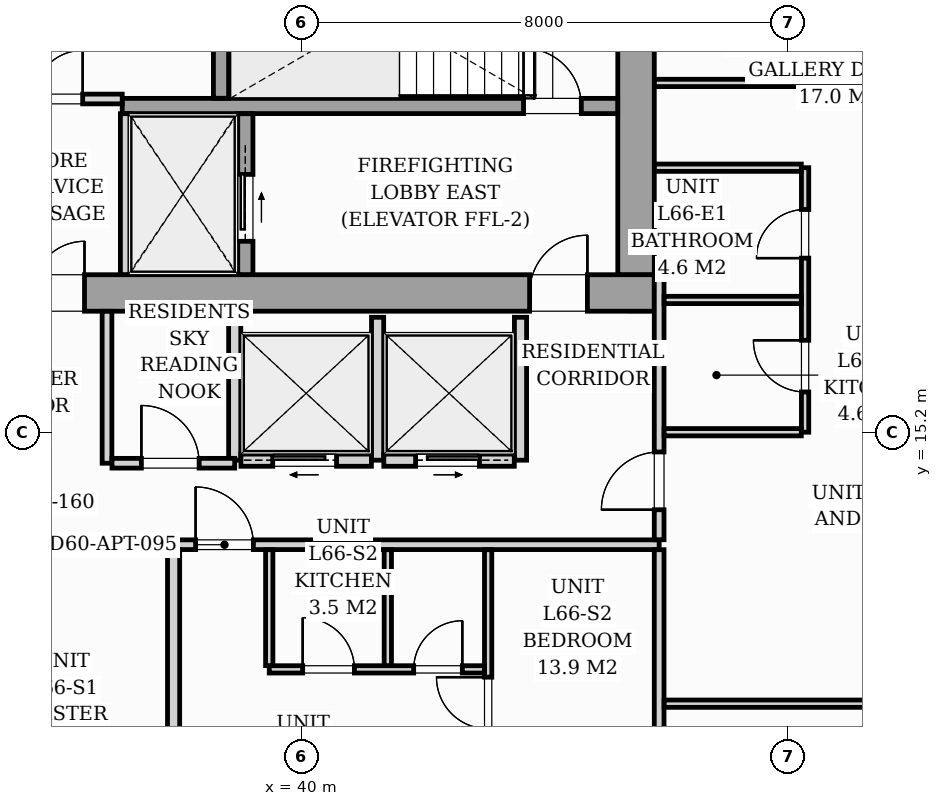
"""IFC4 building model, lengths in metres.
Left out: names, types, materials, properties, quantities, classifications, styles, units other than length and angle.
Written with IfcOpenShell. Run it as: python <this file> out.ifc"""

import sys

from ifc_helpers import new_model, si_unit, direction, frame, frame_2d, origin, origin_2d, place, context, subcontext, project, spatial, rectangle, i_section, extrude, source, transform, mapped, element, fill, save


model = new_model("IFC4")
c1 = context("Model", 3, precision=1e-05, world=origin(), true_north=direction((0.0, 1.0)))
c2 = subcontext(c1, "Body", "Model", "MODEL_VIEW")
j1 = project(units=[si_unit("LENGTHUNIT", "METRE"), si_unit("PLANEANGLEUNIT", "RADIAN")], contexts=[c1])
p1 = place(None, origin())
s1 = spatial("IfcSite", under=j1, at=p1, CompositionType="ELEMENT")
p2 = place(p1, origin())
s2 = spatial("IfcBuilding", under=s1, at=p2, CompositionType="ELEMENT")
p3 = place(p2, frame((0.0, 0.0, 229.8)))
s3 = spatial("IfcBuildingStorey", under=s2, at=p3, CompositionType="ELEMENT", Elevation=229.8)
m1 = source(origin(), c2, "Body", "SweptSolid", [
    extrude(i_section(OverallWidth=0.409, OverallDepth=0.425, WebThickness=0.033, FlangeThickness=0.052, FilletRadius=0.018, at=origin_2d()), origin(), (0.0, 0.0, 1.0), 3.296),
])
for number, where, z_axis, x_axis in (
    (1, (38.88, 17.4, 0.002), (0.0, 0.0, 1.0), (1.0, 0.0, 0.0)),
    (2, (45.6, 17.4, 0.002), (0.0, 0.0, 1.0), (1.0, 0.0, 0.0)),
):
    element("IfcColumn", number, at=place(p3, frame(where, z_axis=z_axis, x_axis=x_axis)), inside=s3, PredefinedType="PILASTER", context=c2, shape_type="MappedRepresentation", body=[
        mapped(m1, transform((0.0, 0.0, 0.0), scale=1.0)),
    ])
p4 = place(p3, frame((26.2, 17.5, 0.0), z_axis=(0.0, 0.0, 1.0), x_axis=(1.0, 0.0, 0.0)))
e3 = element("IfcWall", 3, at=p4, inside=s3, PredefinedType="SHEAR", context=c2, shape_type="SweptSolid", body=[
    extrude(rectangle(XDim=19.6, YDim=0.6, at=frame_2d((9.8, 0.0))), origin(), (0.0, 0.0, 1.0), 3.3),
])
p5 = place(p4, frame((0.95, 0.0, 0.0)))
e4 = element("IfcOpeningElement", 4, at=p5, cuts=e3, PredefinedType="OPENING", context=c2, shape_type="SweptSolid", body=[
    extrude(rectangle(XDim=0.95, YDim=2.06, at=frame_2d((0.475, 1.03))), frame((0.0, 0.31, 0.0), z_axis=(0.0, -1.0, 0.0), x_axis=(1.0, 0.0, 0.0)), (0.0, 0.0, 1.0), 0.62),
])
p6 = place(p4, frame((9.38, 0.0, 0.0)))
e5 = element("IfcOpeningElement", 5, at=p6, cuts=e3, PredefinedType="OPENING", context=c2, shape_type="SweptSolid", body=[
    extrude(rectangle(XDim=0.85, YDim=2.0, at=frame_2d((0.425, 1.0))), frame((0.0, 0.31, 0.0), z_axis=(0.0, -1.0, 0.0), x_axis=(1.0, 0.0, 0.0)), (0.0, 0.0, 1.0), 0.62),
])
p7 = place(p4, frame((17.55, 0.0, 0.0)))
e6 = element("IfcOpeningElement", 6, at=p7, cuts=e3, PredefinedType="OPENING", context=c2, shape_type="SweptSolid", body=[
    extrude(rectangle(XDim=0.95, YDim=2.06, at=frame_2d((0.475, 1.03))), frame((0.0, 0.31, 0.0), z_axis=(0.0, -1.0, 0.0), x_axis=(1.0, 0.0, 0.0)), (0.0, 0.0, 1.0), 0.62),
])
p8 = place(p3, frame((45.5, 17.802, 0.0), z_axis=(0.0, 0.0, 1.0), x_axis=(0.0, 1.0, 0.0)))
e7 = element("IfcWall", 7, at=p8, inside=s3, PredefinedType="SHEAR", context=c2, shape_type="SweptSolid", body=[
    extrude(rectangle(XDim=5.796, YDim=0.6, at=frame_2d((2.898, 0.0))), origin(), (0.0, 0.0, 1.0), 3.3),
])
p9 = place(p3, frame((37.05, 20.575, 0.0), z_axis=(0.0, 0.0, 1.0), x_axis=(1.0, 0.0, 0.0)))
e8 = element("IfcWall", 8, at=p9, inside=s3, PredefinedType="SOLIDWALL", context=c2, shape_type="SweptSolid", body=[
    extrude(rectangle(XDim=8.148, YDim=0.25, at=frame_2d((4.074, 0.0))), origin(), (0.0, 0.0, 1.0), 3.3),
])
p10 = place(p9, frame((6.6, 0.0, 0.0)))
e9 = element("IfcOpeningElement", 9, at=p10, cuts=e8, PredefinedType="OPENING", context=c2, shape_type="SweptSolid", body=[
    extrude(rectangle(XDim=0.95, YDim=2.06, at=frame_2d((0.475, 1.03))), frame((0.0, 0.135, 0.0), z_axis=(0.0, -1.0, 0.0), x_axis=(1.0, 0.0, 0.0)), (0.0, 0.0, 1.0), 0.27),
])
p11 = place(p3, frame((38.675, 20.702, 0.0), z_axis=(0.0, 0.0, 1.0), x_axis=(0.0, 1.0, 0.0)))
e10 = element("IfcWall", 10, at=p11, inside=s3, PredefinedType="SOLIDWALL", context=c2, shape_type="SweptSolid", body=[
    extrude(rectangle(XDim=2.896, YDim=0.25, at=frame_2d((1.448, 0.0))), origin(), (0.0, 0.0, 1.0), 3.3),
])
p12 = place(p3, frame((37.1, 17.802, 0.0), z_axis=(0.0, 0.0, 1.0), x_axis=(0.0, 1.0, 0.0)))
e11 = element("IfcWall", 11, at=p12, inside=s3, PredefinedType="PARTITIONING", context=c2, shape_type="SweptSolid", body=[
    extrude(rectangle(XDim=2.646, YDim=0.16, at=frame_2d((1.323, 0.0))), origin(), (0.0, 0.0, 1.0), 3.04),
])
p13 = place(p3, frame((39.075, 17.802, 0.0), z_axis=(0.0, 0.0, 1.0), x_axis=(0.0, 1.0, 0.0)))
e12 = element("IfcWall", 12, at=p13, inside=s3, PredefinedType="SOLIDWALL", context=c2, shape_type="SweptSolid", body=[
    extrude(rectangle(XDim=2.646, YDim=0.25, at=frame_2d((1.323, 0.0))), origin(), (0.0, 0.0, 1.0), 3.3),
])
p14 = place(p13, frame((0.548, 0.0, 0.0)))
e13 = element("IfcOpeningElement", 13, at=p14, cuts=e12, PredefinedType="OPENING", context=c2, shape_type="SweptSolid", body=[
    extrude(rectangle(XDim=1.1, YDim=2.08, at=frame_2d((0.55, 1.04))), frame((0.0, 0.135, 0.0), z_axis=(0.0, -1.0, 0.0), x_axis=(1.0, 0.0, 0.0)), (0.0, 0.0, 1.0), 0.27),
])
p15 = place(p3, frame((34.95, 20.69, 0.0), z_axis=(0.0, 0.0, 1.0), x_axis=(1.0, 0.0, 0.0)))
e14 = element("IfcWall", 14, at=p15, inside=s3, PredefinedType="PARTITIONING", context=c2, shape_type="SweptSolid", body=[
    extrude(rectangle(XDim=2.1, YDim=0.16, at=frame_2d((1.05, 0.0))), origin(), (0.0, 0.0, 1.0), 3.04),
])
p16 = place(p15, frame((0.65, 0.0, 0.0)))
e15 = element("IfcOpeningElement", 15, at=p16, cuts=e14, PredefinedType="OPENING", context=c2, shape_type="SweptSolid", body=[
    extrude(rectangle(XDim=0.8, YDim=2.05, at=frame_2d((0.4, 1.025))), frame((0.0, 0.09, 0.0), z_axis=(0.0, -1.0, 0.0), x_axis=(1.0, 0.0, 0.0)), (0.0, 0.0, 1.0), 0.18),
])
for number, where, z_axis, x_axis in (
    (16, (38.9, 14.75, 0.0), (0.0, 0.0, 1.0), (0.0, 1.0, 0.0)),
    (17, (41.25, 14.75, 0.0), (0.0, 0.0, 1.0), (0.0, 1.0, 0.0)),
    (18, (43.6, 14.75, 0.0), (0.0, 0.0, 1.0), (0.0, 1.0, 0.0)),
):
    element("IfcWall", number, at=place(p3, frame(where, z_axis=z_axis, x_axis=x_axis)), inside=s3, PredefinedType="PARTITIONING", context=c2, shape_type="SweptSolid", body=[
        extrude(rectangle(XDim=2.35, YDim=0.2, at=frame_2d((1.175, 0.0))), origin(), (0.0, 0.0, 1.0), 3.04),
    ])
p17 = place(p3, frame((39.002, 14.75, 0.0), z_axis=(0.0, 0.0, 1.0), x_axis=(1.0, 0.0, 0.0)))
e19 = element("IfcWall", 19, at=p17, inside=s3, PredefinedType="PARTITIONING", context=c2, shape_type="SweptSolid", body=[
    extrude(rectangle(XDim=2.146, YDim=0.2, at=frame_2d((1.073, 0.0))), origin(), (0.0, 0.0, 1.0), 3.04),
])
p18 = place(p17, frame((0.523, 0.0, 0.0)))
e20 = element("IfcOpeningElement", 20, at=p18, cuts=e19, PredefinedType="OPENING", context=c2, shape_type="SweptSolid", body=[
    extrude(rectangle(XDim=1.05, YDim=2.08, at=frame_2d((0.525, 1.04))), frame((0.0, 0.11, 0.0), z_axis=(0.0, -1.0, 0.0), x_axis=(1.0, 0.0, 0.0)), (0.0, 0.0, 1.0), 0.22),
])
p19 = place(p3, frame((41.352, 14.75, 0.0), z_axis=(0.0, 0.0, 1.0), x_axis=(1.0, 0.0, 0.0)))
e21 = element("IfcWall", 21, at=p19, inside=s3, PredefinedType="PARTITIONING", context=c2, shape_type="SweptSolid", body=[
    extrude(rectangle(XDim=2.146, YDim=0.2, at=frame_2d((1.073, 0.0))), origin(), (0.0, 0.0, 1.0), 3.04),
])
p20 = place(p19, frame((0.523, 0.0, 0.0)))
e22 = element("IfcOpeningElement", 22, at=p20, cuts=e21, PredefinedType="OPENING", context=c2, shape_type="SweptSolid", body=[
    extrude(rectangle(XDim=1.05, YDim=2.08, at=frame_2d((0.525, 1.04))), frame((0.0, 0.11, 0.0), z_axis=(0.0, -1.0, 0.0), x_axis=(1.0, 0.0, 0.0)), (0.0, 0.0, 1.0), 0.22),
])
p21 = place(p3, frame((24.55, 13.36, 0.0), z_axis=(0.0, 0.0, 1.0), x_axis=(1.0, 0.0, 0.0)))
e23 = element("IfcWall", 23, at=p21, inside=s3, PredefinedType="PARTITIONING", context=c2, shape_type="SweptSolid", body=[
    extrude(rectangle(XDim=21.33, YDim=0.16, at=frame_2d((10.665, 0.0))), origin(), (0.0, 0.0, 1.0), 2.55),
])
p22 = place(p21, frame((2.37, 0.0, 0.0)))
e24 = element("IfcOpeningElement", 24, at=p22, cuts=e23, PredefinedType="OPENING", context=c2, shape_type="SweptSolid", body=[
    extrude(rectangle(XDim=0.95, YDim=2.06, at=frame_2d((0.475, 1.03))), frame((0.0, 0.09, 0.0), z_axis=(0.0, -1.0, 0.0), x_axis=(1.0, 0.0, 0.0)), (0.0, 0.0, 1.0), 0.18),
])
p23 = place(p21, frame((13.707, 0.0, 0.0)))
e25 = element("IfcOpeningElement", 25, at=p23, cuts=e23, PredefinedType="OPENING", context=c2, shape_type="SweptSolid", body=[
    extrude(rectangle(XDim=0.95, YDim=2.06, at=frame_2d((0.475, 1.03))), frame((0.0, 0.09, 0.0), z_axis=(0.0, -1.0, 0.0), x_axis=(1.0, 0.0, 0.0)), (0.0, 0.0, 1.0), 0.18),
])
p24 = place(p3, frame((45.88, 8.136, 0.0), z_axis=(0.0, 0.0, 1.0), x_axis=(0.0, 1.0, 0.0)))
e26 = element("IfcWall", 26, at=p24, inside=s3, PredefinedType="PARTITIONING", context=c2, shape_type="SweptSolid", body=[
    extrude(rectangle(XDim=5.142, YDim=0.16, at=frame_2d((2.571, 0.0))), origin(), (0.0, 0.0, 1.0), 3.04),
])
p25 = place(p3, frame((45.88, 13.442, 0.0), z_axis=(0.0, 0.0, 1.0), x_axis=(0.0, 1.0, 0.0)))
e27 = element("IfcWall", 27, at=p25, inside=s3, PredefinedType="PARTITIONING", context=c2, shape_type="SweptSolid", body=[
    extrude(rectangle(XDim=4.36, YDim=0.16, at=frame_2d((2.18, 0.0))), origin(), (0.0, 0.0, 1.0), 3.04),
])
p26 = place(p25, frame((0.493, 0.0, 0.0)))
e28 = element("IfcOpeningElement", 28, at=p26, cuts=e27, PredefinedType="OPENING", context=c2, shape_type="SweptSolid", body=[
    extrude(rectangle(XDim=0.95, YDim=2.06, at=frame_2d((0.475, 1.03))), frame((0.0, 0.09, 0.0), z_axis=(0.0, -1.0, 0.0), x_axis=(1.0, 0.0, 0.0)), (0.0, 0.0, 1.0), 0.18),
])
p27 = place(p3, frame((37.895, 8.68, 0.0), z_axis=(0.0, 0.0, 1.0), x_axis=(0.0, 1.0, 0.0)))
e29 = element("IfcWall", 29, at=p27, inside=s3, PredefinedType="PARTITIONING", context=c2, shape_type="SweptSolid", body=[
    extrude(rectangle(XDim=4.598, YDim=0.2, at=frame_2d((2.299, 0.0))), origin(), (0.0, 0.0, 1.0), 3.04),
])
p28 = place(p3, frame((43.068, 8.392, 0.0), z_axis=(0.0, 0.0, 1.0), x_axis=(0.0, 1.0, 0.0)))
e30 = element("IfcWall", 30, at=p28, inside=s3, PredefinedType="PARTITIONING", context=c2, shape_type="SweptSolid", body=[
    extrude(rectangle(XDim=4.886, YDim=0.12, at=frame_2d((2.443, 0.0))), origin(), (0.0, 0.0, 1.0), 3.04),
])
p29 = place(p28, frame((1.94, 0.0, 0.0)))
e31 = element("IfcOpeningElement", 31, at=p29, cuts=e30, PredefinedType="OPENING", context=c2, shape_type="SweptSolid", body=[
    extrude(rectangle(XDim=0.85, YDim=2.05, at=frame_2d((0.425, 1.025))), frame((0.0, 0.07, 0.0), z_axis=(0.0, -1.0, 0.0), x_axis=(1.0, 0.0, 0.0)), (0.0, 0.0, 1.0), 0.14),
])
p30 = place(p3, frame((39.468, 11.31, 0.0), z_axis=(0.0, 0.0, 1.0), x_axis=(1.0, 0.0, 0.0)))
e32 = element("IfcWall", 32, at=p30, inside=s3, PredefinedType="PARTITIONING", context=c2, shape_type="SweptSolid", body=[
    extrude(rectangle(XDim=3.538, YDim=0.12, at=frame_2d((1.769, 0.0))), origin(), (0.0, 0.0, 1.0), 3.04),
])
p31 = place(p30, frame((0.55, 0.0, 0.0)))
e33 = element("IfcOpeningElement", 33, at=p31, cuts=e32, PredefinedType="OPENING", context=c2, shape_type="SweptSolid", body=[
    extrude(rectangle(XDim=0.85, YDim=2.05, at=frame_2d((0.425, 1.025))), frame((0.0, 0.07, 0.0), z_axis=(0.0, -1.0, 0.0), x_axis=(1.0, 0.0, 0.0)), (0.0, 0.0, 1.0), 0.14),
])
p32 = place(p30, frame((2.375, 0.0, 0.0)))
e34 = element("IfcOpeningElement", 34, at=p32, cuts=e32, PredefinedType="OPENING", context=c2, shape_type="SweptSolid", body=[
    extrude(rectangle(XDim=0.8, YDim=2.02, at=frame_2d((0.4, 1.01))), frame((0.0, 0.07, 0.0), z_axis=(0.0, -1.0, 0.0), x_axis=(1.0, 0.0, 0.0)), (0.0, 0.0, 1.0), 0.14),
])
for number, where, z_axis, x_axis in (
    (35, (39.468, 11.372, 0.0), (0.0, 0.0, 1.0), (0.0, 1.0, 0.0)),
    (36, (41.418, 11.372, 0.0), (0.0, 0.0, 1.0), (0.0, 1.0, 0.0)),
):
    element("IfcWall", number, at=place(p3, frame(where, z_axis=z_axis, x_axis=x_axis)), inside=s3, PredefinedType="PARTITIONING", context=c2, shape_type="SweptSolid", body=[
        extrude(rectangle(XDim=1.906, YDim=0.12, at=frame_2d((0.953, 0.0))), origin(), (0.0, 0.0, 1.0), 3.04),
    ])
p33 = place(p3, frame((48.28, 15.21, 0.0), z_axis=(0.0, 0.0, 1.0), x_axis=(0.0, 1.0, 0.0)))
e37 = element("IfcWall", 37, at=p33, inside=s3, PredefinedType="PARTITIONING", context=c2, shape_type="SweptSolid", body=[
    extrude(rectangle(XDim=4.35, YDim=0.12, at=frame_2d((2.175, 0.0))), origin(), (0.0, 0.0, 1.0), 3.04),
])
p34 = place(p33, frame((0.662, 0.0, 0.0)))
e38 = element("IfcOpeningElement", 38, at=p34, cuts=e37, PredefinedType="OPENING", context=c2, shape_type="SweptSolid", body=[
    extrude(rectangle(XDim=0.85, YDim=2.05, at=frame_2d((0.425, 1.025))), frame((0.0, 0.07, 0.0), z_axis=(0.0, -1.0, 0.0), x_axis=(1.0, 0.0, 0.0)), (0.0, 0.0, 1.0), 0.14),
])
p35 = place(p33, frame((2.863, 0.0, 0.0)))
e39 = element("IfcOpeningElement", 39, at=p35, cuts=e37, PredefinedType="OPENING", context=c2, shape_type="SweptSolid", body=[
    extrude(rectangle(XDim=0.8, YDim=2.02, at=frame_2d((0.4, 1.01))), frame((0.0, 0.07, 0.0), z_axis=(0.0, -1.0, 0.0), x_axis=(1.0, 0.0, 0.0)), (0.0, 0.0, 1.0), 0.14),
])
p36 = place(p3, frame((45.962, 17.385, 0.0), z_axis=(0.0, 0.0, 1.0), x_axis=(1.0, 0.0, 0.0)))
e40 = element("IfcWall", 40, at=p36, inside=s3, PredefinedType="PARTITIONING", context=c2, shape_type="SweptSolid", body=[
    extrude(rectangle(XDim=2.256, YDim=0.12, at=frame_2d((1.128, 0.0))), origin(), (0.0, 0.0, 1.0), 2.381),
])
p37 = place(p3, frame((45.962, 15.21, 0.0), z_axis=(0.0, 0.0, 1.0), x_axis=(1.0, 0.0, 0.0)))
e41 = element("IfcWall", 41, at=p37, inside=s3, PredefinedType="PARTITIONING", context=c2, shape_type="SweptSolid", body=[
    extrude(rectangle(XDim=2.256, YDim=0.12, at=frame_2d((1.128, 0.0))), origin(), (0.0, 0.0, 1.0), 3.04),
])
p38 = place(p3, frame((45.802, 19.56, 0.0), z_axis=(0.0, 0.0, 1.0), x_axis=(1.0, 0.0, 0.0)))
e42 = element("IfcWall", 42, at=p38, inside=s3, PredefinedType="PARTITIONING", context=c2, shape_type="SweptSolid", body=[
    extrude(rectangle(XDim=2.416, YDim=0.12, at=frame_2d((1.208, 0.0))), origin(), (0.0, 0.0, 1.0), 3.04),
])
p39 = place(p3, frame((45.962, 10.746, 0.0), z_axis=(0.0, 0.0, 1.0), x_axis=(1.0, 0.0, 0.0)))
e43 = element("IfcWall", 43, at=p39, inside=s3, PredefinedType="PARTITIONING", context=c2, shape_type="SweptSolid", body=[
    extrude(rectangle(XDim=9.594, YDim=0.12, at=frame_2d((4.797, 0.0))), origin(), (0.0, 0.0, 1.0), 3.04),
])
p40 = place(p39, frame((4.378, 0.0, 0.0)))
e44 = element("IfcOpeningElement", 44, at=p40, cuts=e43, PredefinedType="OPENING", context=c2, shape_type="SweptSolid", body=[
    extrude(rectangle(XDim=0.85, YDim=2.05, at=frame_2d((0.425, 1.025))), frame((0.0, 0.07, 0.0), z_axis=(0.0, -1.0, 0.0), x_axis=(1.0, 0.0, 0.0)), (0.0, 0.0, 1.0), 0.14),
])
p41 = place(p3, frame((45.802, 20.954, 0.0), z_axis=(0.0, 0.0, 1.0), x_axis=(1.0, 0.0, 0.0)))
e45 = element("IfcWall", 45, at=p41, inside=s3, PredefinedType="PARTITIONING", context=c2, shape_type="SweptSolid", body=[
    extrude(rectangle(XDim=10.683, YDim=0.12, at=frame_2d((5.342, 0.0))), origin(), (0.0, 0.0, 1.0), 3.04),
])
p42 = place(p41, frame((5.062, 0.0, 0.0)))
e46 = element("IfcOpeningElement", 46, at=p42, cuts=e45, PredefinedType="OPENING", context=c2, shape_type="SweptSolid", body=[
    extrude(rectangle(XDim=0.85, YDim=2.05, at=frame_2d((0.425, 1.025))), frame((0.0, 0.07, 0.0), z_axis=(0.0, -1.0, 0.0), x_axis=(1.0, 0.0, 0.0)), (0.0, 0.0, 1.0), 0.14),
])
p43 = place(p3, frame((36.8, 14.7, 0.0), z_axis=(0.0, 0.0, 1.0), x_axis=(0.0, 1.0, 0.0)))
e47 = element("IfcWall", 47, at=p43, inside=s3, PredefinedType="PARTITIONING", context=c2, shape_type="SweptSolid", body=[
    extrude(rectangle(XDim=2.498, YDim=0.16, at=frame_2d((1.249, 0.0))), origin(), (0.0, 0.0, 1.0), 3.04),
])
p44 = place(p3, frame((36.882, 14.7, 0.0), z_axis=(0.0, 0.0, 1.0), x_axis=(1.0, 0.0, 0.0)))
e48 = element("IfcWall", 48, at=p44, inside=s3, PredefinedType="PARTITIONING", context=c2, shape_type="SweptSolid", body=[
    extrude(rectangle(XDim=2.018, YDim=0.16, at=frame_2d((1.009, 0.0))), origin(), (0.0, 0.0, 1.0), 3.04),
])
p45 = place(p44, frame((0.483, 0.0, 0.0)))
e49 = element("IfcOpeningElement", 49, at=p45, cuts=e48, PredefinedType="OPENING", context=c2, shape_type="SweptSolid", body=[
    extrude(rectangle(XDim=0.95, YDim=2.06, at=frame_2d((0.475, 1.03))), frame((0.0, 0.09, 0.0), z_axis=(0.0, -1.0, 0.0), x_axis=(1.0, 0.0, 0.0)), (0.0, 0.0, 1.0), 0.18),
])
m2 = source(origin(), c2, "Body", "SweptSolid", [
    extrude(rectangle(XDim=0.85, YDim=2.0, at=frame_2d((0.425, 1.0))), frame((0.0, 0.025, 0.0), z_axis=(0.0, -1.0, 0.0), x_axis=(1.0, 0.0, 0.0)), (0.0, 0.0, 1.0), 0.05),
])
p46 = place(p6, origin())
e50 = element("IfcDoor", 50, at=p46, inside=s3, OperationType="SINGLE_SWING_RIGHT", PredefinedType="DOOR", context=c2, shape_type="MappedRepresentation", body=[
    mapped(m2, transform((0.0, 0.0, 0.0), scale=1.0)),
])
fill(e5, e50)
m3 = source(origin(), c2, "Body", "SweptSolid", [
    extrude(rectangle(XDim=0.95, YDim=2.06, at=frame_2d((0.475, 1.03))), frame((0.0, 0.025, 0.0), z_axis=(0.0, -1.0, 0.0), x_axis=(1.0, 0.0, 0.0)), (0.0, 0.0, 1.0), 0.05),
])
p47 = place(p7, origin())
e51 = element("IfcDoor", 51, at=p47, inside=s3, OperationType="SINGLE_SWING_RIGHT", PredefinedType="DOOR", context=c2, shape_type="MappedRepresentation", body=[
    mapped(m3, transform((0.0, 0.0, 0.0), scale=1.0)),
])
fill(e6, e51)
p48 = place(p10, origin())
e52 = element("IfcDoor", 52, at=p48, inside=s3, OperationType="SINGLE_SWING_LEFT", PredefinedType="DOOR", context=c2, shape_type="MappedRepresentation", body=[
    mapped(m3, transform((0.0, 0.0, 0.0), scale=1.0)),
])
fill(e9, e52)
m4 = source(origin(), c2, "Body", "SweptSolid", [
    extrude(rectangle(XDim=1.1, YDim=2.08, at=frame_2d((0.55, 1.04))), frame((0.0, 0.025, 0.0), z_axis=(0.0, -1.0, 0.0), x_axis=(1.0, 0.0, 0.0)), (0.0, 0.0, 1.0), 0.05),
])
p49 = place(p14, origin())
e53 = element("IfcDoor", 53, at=p49, inside=s3, OperationType="SLIDING_TO_RIGHT", PredefinedType="DOOR", context=c2, shape_type="MappedRepresentation", body=[
    mapped(m4, transform((0.0, 0.0, 0.0), scale=1.0)),
])
fill(e13, e53)
m5 = source(origin(), c2, "Body", "SweptSolid", [
    extrude(rectangle(XDim=0.8, YDim=2.05, at=frame_2d((0.4, 1.025))), frame((0.0, 0.025, 0.0), z_axis=(0.0, -1.0, 0.0), x_axis=(1.0, 0.0, 0.0)), (0.0, 0.0, 1.0), 0.05),
])
p50 = place(p16, origin())
e54 = element("IfcDoor", 54, at=p50, inside=s3, OperationType="SINGLE_SWING_RIGHT", PredefinedType="DOOR", context=c2, shape_type="MappedRepresentation", body=[
    mapped(m5, transform((0.0, 0.0, 0.0), scale=1.0)),
])
fill(e15, e54)
m6 = source(origin(), c2, "Body", "SweptSolid", [
    extrude(rectangle(XDim=1.05, YDim=2.08, at=frame_2d((0.525, 1.04))), frame((0.0, 0.025, 0.0), z_axis=(0.0, -1.0, 0.0), x_axis=(1.0, 0.0, 0.0)), (0.0, 0.0, 1.0), 0.05),
])
p51 = place(p18, origin())
e55 = element("IfcDoor", 55, at=p51, inside=s3, OperationType="SLIDING_TO_LEFT", PredefinedType="DOOR", context=c2, shape_type="MappedRepresentation", body=[
    mapped(m6, transform((0.0, 0.0, 0.0), scale=1.0)),
])
fill(e20, e55)
p52 = place(p20, origin())
e56 = element("IfcDoor", 56, at=p52, inside=s3, OperationType="SLIDING_TO_RIGHT", PredefinedType="DOOR", context=c2, shape_type="MappedRepresentation", body=[
    mapped(m6, transform((0.0, 0.0, 0.0), scale=1.0)),
])
fill(e22, e56)
m7 = source(origin(), c2, "Body", "SweptSolid", [
    extrude(rectangle(XDim=0.95, YDim=2.06, at=frame_2d((0.475, 1.03))), frame((0.0, 0.025, 0.0), z_axis=(0.0, -1.0, 0.0), x_axis=(1.0, 0.0, 0.0)), (0.0, 0.0, 1.0), 0.05),
])
p53 = place(p23, origin())
e57 = element("IfcDoor", 57, at=p53, inside=s3, OperationType="SINGLE_SWING_LEFT", PredefinedType="DOOR", context=c2, shape_type="MappedRepresentation", body=[
    mapped(m7, transform((0.0, 0.0, 0.0), scale=1.0)),
])
fill(e25, e57)
m8 = source(origin(), c2, "Body", "SweptSolid", [
    extrude(rectangle(XDim=0.85, YDim=2.05, at=frame_2d((0.425, 1.025))), frame((0.0, 0.025, 0.0), z_axis=(0.0, -1.0, 0.0), x_axis=(1.0, 0.0, 0.0)), (0.0, 0.0, 1.0), 0.05),
])
p54 = place(p29, origin())
e58 = element("IfcDoor", 58, at=p54, inside=s3, OperationType="SINGLE_SWING_RIGHT", PredefinedType="DOOR", context=c2, shape_type="MappedRepresentation", body=[
    mapped(m8, transform((0.0, 0.0, 0.0), scale=1.0)),
])
fill(e31, e58)
p55 = place(p31, origin())
e59 = element("IfcDoor", 59, at=p55, inside=s3, OperationType="SINGLE_SWING_LEFT", PredefinedType="DOOR", context=c2, shape_type="MappedRepresentation", body=[
    mapped(m8, transform((0.0, 0.0, 0.0), scale=1.0)),
])
fill(e33, e59)
m9 = source(origin(), c2, "Body", "SweptSolid", [
    extrude(rectangle(XDim=0.8, YDim=2.02, at=frame_2d((0.4, 1.01))), frame((0.0, 0.025, 0.0), z_axis=(0.0, -1.0, 0.0), x_axis=(1.0, 0.0, 0.0)), (0.0, 0.0, 1.0), 0.05),
])
p56 = place(p32, origin())
e60 = element("IfcDoor", 60, at=p56, inside=s3, OperationType="SINGLE_SWING_RIGHT", PredefinedType="DOOR", context=c2, shape_type="MappedRepresentation", body=[
    mapped(m9, transform((0.0, 0.0, 0.0), scale=1.0)),
])
fill(e34, e60)
p57 = place(p26, origin())
e61 = element("IfcDoor", 61, at=p57, inside=s3, OperationType="SINGLE_SWING_LEFT", PredefinedType="DOOR", context=c2, shape_type="MappedRepresentation", body=[
    mapped(m7, transform((0.0, 0.0, 0.0), scale=1.0)),
])
fill(e28, e61)
p58 = place(p34, origin())
e62 = element("IfcDoor", 62, at=p58, inside=s3, OperationType="SINGLE_SWING_RIGHT", PredefinedType="DOOR", context=c2, shape_type="MappedRepresentation", body=[
    mapped(m8, transform((0.0, 0.0, 0.0), scale=1.0)),
])
fill(e38, e62)
p59 = place(p35, origin())
e63 = element("IfcDoor", 63, at=p59, inside=s3, OperationType="SINGLE_SWING_LEFT", PredefinedType="DOOR", context=c2, shape_type="MappedRepresentation", body=[
    mapped(m9, transform((0.0, 0.0, 0.0), scale=1.0)),
])
fill(e39, e63)
p60 = place(p45, origin())
e64 = element("IfcDoor", 64, at=p60, inside=s3, OperationType="SINGLE_SWING_LEFT", PredefinedType="DOOR", context=c2, shape_type="MappedRepresentation", body=[
    mapped(m7, transform((0.0, 0.0, 0.0), scale=1.0)),
])
fill(e49, e64)
save(model, sys.argv[1])
